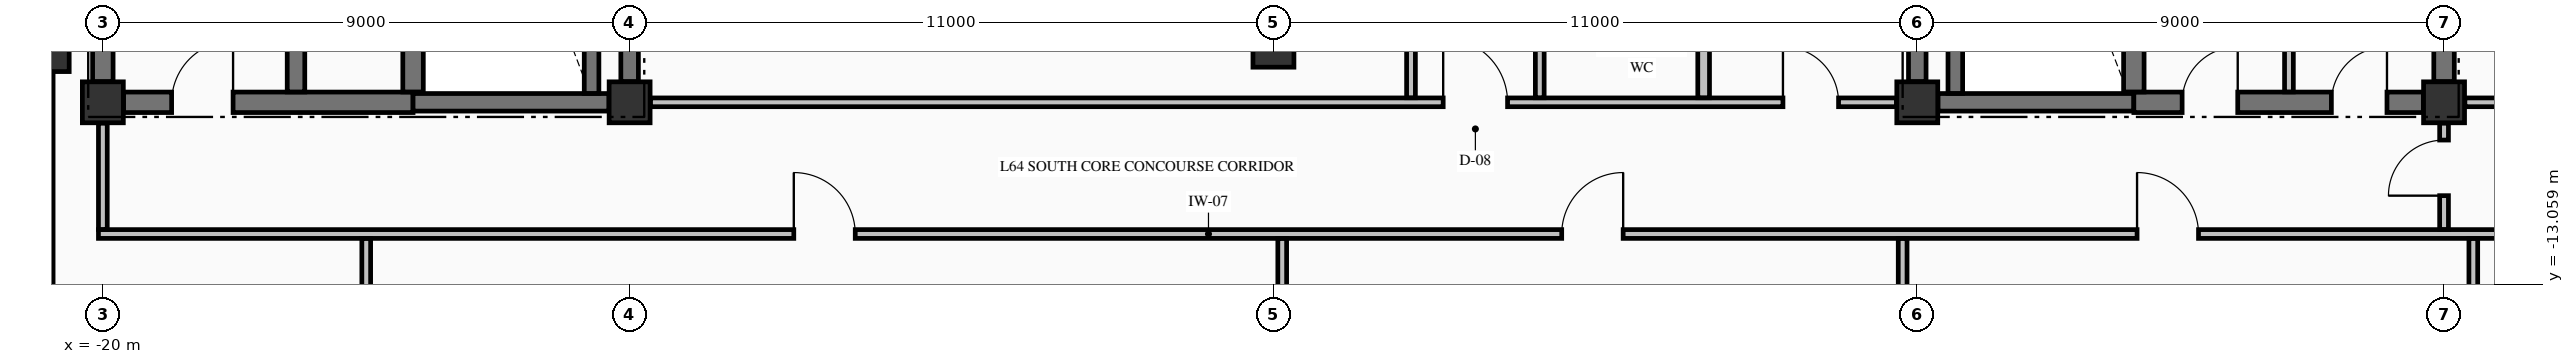
"""IFC4 building model, lengths in metres.
Left out: names, types, materials, properties, quantities, classifications, styles, units other than length and angle.
Written with IfcOpenShell. Run it as: python <this file> out.ifc"""

import sys

from ifc_helpers import new_model, si_unit, direction, frame, frame_2d, origin, origin_2d, place, context, subcontext, project, spatial, rectangle, extrude, element, fill, save


model = new_model("IFC4")
c1 = context("Model", 3, precision=1e-05, world=origin(), true_north=direction((0.0, 1.0)))
c2 = subcontext(c1, "Body", "Model", "MODEL_VIEW")
j1 = project(units=[si_unit("LENGTHUNIT", "METRE"), si_unit("PLANEANGLEUNIT", "RADIAN")], contexts=[c1])
p1 = place(None, origin())
s1 = spatial("IfcSite", under=j1, at=p1, CompositionType="ELEMENT")
p2 = place(p1, origin())
s2 = spatial("IfcBuilding", under=s1, at=p2, CompositionType="ELEMENT")
p3 = place(p2, frame((0.0, 0.0, 242.97)))
s3 = spatial("IfcBuildingStorey", under=s2, at=p3, CompositionType="ELEMENT", Elevation=242.97)
p4 = place(p3, frame((-21.0, -9.0, -0.25), z_axis=(0.0, 0.0, 1.0), x_axis=(1.0, 0.0, 0.0)))
e1 = element("IfcColumn", 1, at=p4, inside=s3, PredefinedType="COLUMN", context=c2, shape_type="SweptSolid", body=[
    extrude(rectangle(XDim=0.85, YDim=0.85, at=origin_2d()), origin(), (0.0, 0.0, 1.0), 3.23),
])
for number, where, z_axis, x_axis in (
    (2, (-20.0, -9.95, -0.25), (0.0, 0.0, 1.0), (1.0, 0.0, 0.0)),
    (3, (-11.0, -9.95, -0.25), (0.0, 0.0, 1.0), (1.0, 0.0, 0.0)),
    (4, (11.0, -9.95, -0.25), (0.0, 0.0, 1.0), (1.0, 0.0, 0.0)),
    (5, (20.0, -9.95, -0.25), (0.0, 0.0, 1.0), (1.0, 0.0, 0.0)),
    (6, (0.0, -9.0, -0.25), (0.0, 0.0, 1.0), (1.0, 0.0, 0.0)),
):
    element("IfcColumn", number, at=place(p3, frame(where, z_axis=z_axis, x_axis=x_axis)), inside=s3, PredefinedType="COLUMN", context=c2, shape_type="SweptSolid", body=[
        extrude(rectangle(XDim=0.7, YDim=0.7, at=origin_2d()), origin(), (0.0, 0.0, 1.0), 3.23),
    ])
p5 = place(p3, frame((-21.0, -9.455, 0.0), z_axis=(0.0, 0.0, 1.0), x_axis=(0.0, -1.0, 0.0)))
e7 = element("IfcWall", 7, at=p5, inside=s3, PredefinedType="STANDARD", context=c2, shape_type="SweptSolid", body=[
    extrude(rectangle(XDim=8.09, YDim=0.3, at=frame_2d((4.045, 0.0))), origin(), (0.0, 0.0, 1.0), 2.372),
])
p6 = place(p3, frame((-19.646, -9.95, 0.0), z_axis=(0.0, 0.0, 1.0), x_axis=(1.0, 0.0, 0.0)))
e8 = element("IfcWall", 8, at=p6, inside=s3, PredefinedType="SHEAR", context=c2, shape_type="SweptSolid", body=[
    extrude(rectangle(XDim=4.946, YDim=0.35, at=frame_2d((2.473, 0.0))), origin(), (0.0, 0.0, 1.0), 2.98),
])
p7 = place(p6, frame((0.821, 0.0, 0.0)))
e9 = element("IfcOpeningElement", 9, at=p7, cuts=e8, PredefinedType="OPENING", context=c2, shape_type="SweptSolid", body=[
    extrude(rectangle(XDim=1.05, YDim=2.15, at=frame_2d((0.525, 1.075))), frame((0.0, 0.185, 0.0), z_axis=(0.0, -1.0, 0.0), x_axis=(1.0, 0.0, 0.0)), (0.0, 0.0, 1.0), 0.37),
])
for number, where, z_axis, x_axis in (
    (10, (-14.7, -9.95, 0.0), (0.0, 0.0, 1.0), (1.0, 0.0, 0.0)),
    (11, (11.354, -9.95, 0.0), (0.0, 0.0, 1.0), (1.0, 0.0, 0.0)),
):
    element("IfcWall", number, at=place(p3, frame(where, z_axis=z_axis, x_axis=x_axis)), inside=s3, PredefinedType="SHEAR", context=c2, shape_type="SweptSolid", body=[
        extrude(rectangle(XDim=3.346, YDim=0.3, at=frame_2d((1.673, 0.0))), origin(), (0.0, 0.0, 1.0), 2.98),
    ])
p8 = place(p3, frame((14.7, -9.95, 0.0), z_axis=(0.0, 0.0, 1.0), x_axis=(1.0, 0.0, 0.0)))
e12 = element("IfcWall", 12, at=p8, inside=s3, PredefinedType="SHEAR", context=c2, shape_type="SweptSolid", body=[
    extrude(rectangle(XDim=4.946, YDim=0.35, at=frame_2d((2.473, 0.0))), origin(), (0.0, 0.0, 1.0), 2.98),
])
p9 = place(p8, frame((0.825, 0.0, 0.0)))
e13 = element("IfcOpeningElement", 13, at=p9, cuts=e12, PredefinedType="OPENING", context=c2, shape_type="SweptSolid", body=[
    extrude(rectangle(XDim=0.95, YDim=2.15, at=frame_2d((0.475, 1.075))), frame((0.0, 0.185, 0.0), z_axis=(0.0, -1.0, 0.0), x_axis=(1.0, 0.0, 0.0)), (0.0, 0.0, 1.0), 0.37),
])
p10 = place(p8, frame((3.375, 0.0, 0.0)))
e14 = element("IfcOpeningElement", 14, at=p10, cuts=e12, PredefinedType="OPENING", context=c2, shape_type="SweptSolid", body=[
    extrude(rectangle(XDim=0.95, YDim=2.15, at=frame_2d((0.475, 1.075))), frame((0.0, 0.185, 0.0), z_axis=(0.0, -1.0, 0.0), x_axis=(1.0, 0.0, 0.0)), (0.0, 0.0, 1.0), 0.37),
])
p11 = place(p3, frame((-20.075, -12.2, 0.0), z_axis=(0.0, 0.0, 1.0), x_axis=(1.0, 0.0, 0.0)))
e15 = element("IfcWall", 15, at=p11, inside=s3, PredefinedType="PARTITIONING", context=c2, shape_type="SweptSolid", body=[
    extrude(rectangle(XDim=45.91, YDim=0.15, at=frame_2d((22.955, 0.0))), origin(), (0.0, 0.0, 1.0), 2.98),
])
p12 = place(p11, frame((11.88, 0.0, 0.0)))
e16 = element("IfcOpeningElement", 16, at=p12, cuts=e15, PredefinedType="OPENING", context=c2, shape_type="SweptSolid", body=[
    extrude(rectangle(XDim=1.05, YDim=2.15, at=frame_2d((0.525, 1.075))), frame((0.0, 0.085, 0.0), z_axis=(0.0, -1.0, 0.0), x_axis=(1.0, 0.0, 0.0)), (0.0, 0.0, 1.0), 0.17),
])
p13 = place(p11, frame((25.0, 0.0, 0.0)))
e17 = element("IfcOpeningElement", 17, at=p13, cuts=e15, PredefinedType="OPENING", context=c2, shape_type="SweptSolid", body=[
    extrude(rectangle(XDim=1.05, YDim=2.15, at=frame_2d((0.525, 1.075))), frame((0.0, 0.085, 0.0), z_axis=(0.0, -1.0, 0.0), x_axis=(1.0, 0.0, 0.0)), (0.0, 0.0, 1.0), 0.17),
])
p14 = place(p11, frame((34.83, 0.0, 0.0)))
e18 = element("IfcOpeningElement", 18, at=p14, cuts=e15, PredefinedType="OPENING", context=c2, shape_type="SweptSolid", body=[
    extrude(rectangle(XDim=1.05, YDim=2.15, at=frame_2d((0.525, 1.075))), frame((0.0, 0.085, 0.0), z_axis=(0.0, -1.0, 0.0), x_axis=(1.0, 0.0, 0.0)), (0.0, 0.0, 1.0), 0.17),
])
p15 = place(p3, frame((-10.644, -9.95, 0.0), z_axis=(0.0, 0.0, 1.0), x_axis=(1.0, 0.0, 0.0)))
e19 = element("IfcWall", 19, at=p15, inside=s3, PredefinedType="PARTITIONING", context=c2, shape_type="SweptSolid", body=[
    extrude(rectangle(XDim=21.288, YDim=0.15, at=frame_2d((10.644, 0.0))), origin(), (0.0, 0.0, 1.0), 2.98),
])
p16 = place(p15, frame((13.544, 0.0, 0.0)))
e20 = element("IfcOpeningElement", 20, at=p16, cuts=e19, PredefinedType="OPENING", context=c2, shape_type="SweptSolid", body=[
    extrude(rectangle(XDim=1.1, YDim=2.15, at=frame_2d((0.55, 1.075))), frame((0.0, 0.085, 0.0), z_axis=(0.0, -1.0, 0.0), x_axis=(1.0, 0.0, 0.0)), (0.0, 0.0, 1.0), 0.17),
])
p17 = place(p15, frame((19.349, 0.0, 0.0)))
e21 = element("IfcOpeningElement", 21, at=p17, cuts=e19, PredefinedType="OPENING", context=c2, shape_type="SweptSolid", body=[
    extrude(rectangle(XDim=0.95, YDim=2.15, at=frame_2d((0.475, 1.075))), frame((0.0, 0.085, 0.0), z_axis=(0.0, -1.0, 0.0), x_axis=(1.0, 0.0, 0.0)), (0.0, 0.0, 1.0), 0.17),
])
p18 = place(p3, frame((20.356, -9.95, 0.0), z_axis=(0.0, 0.0, 1.0), x_axis=(1.0, 0.0, 0.0)))
e22 = element("IfcWall", 22, at=p18, inside=s3, PredefinedType="PARTITIONING", context=c2, shape_type="SweptSolid", body=[
    extrude(rectangle(XDim=5.479, YDim=0.15, at=frame_2d((2.74, 0.0))), origin(), (0.0, 0.0, 1.0), 2.98),
])
p19 = place(p18, frame((2.144, 0.0, 0.0)))
e23 = element("IfcOpeningElement", 23, at=p19, cuts=e22, PredefinedType="OPENING", context=c2, shape_type="SweptSolid", body=[
    extrude(rectangle(XDim=1.0, YDim=2.15, at=frame_2d((0.5, 1.075))), frame((0.0, 0.085, 0.0), z_axis=(0.0, -1.0, 0.0), x_axis=(1.0, 0.0, 0.0)), (0.0, 0.0, 1.0), 0.17),
])
p20 = place(p3, frame((-20.0, -9.596, 0.0), z_axis=(0.0, 0.0, 1.0), x_axis=(0.0, 1.0, 0.0)))
e24 = element("IfcWall", 24, at=p20, inside=s3, PredefinedType="SHEAR", context=c2, shape_type="SweptSolid", body=[
    extrude(rectangle(XDim=9.194, YDim=0.35, at=frame_2d((4.597, 0.0))), origin(), (0.0, 0.0, 1.0), 2.98),
])
p21 = place(p3, frame((-16.7, -9.773, 0.0), z_axis=(0.0, 0.0, 1.0), x_axis=(0.0, 1.0, 0.0)))
e25 = element("IfcWall", 25, at=p21, inside=s3, PredefinedType="SHEAR", context=c2, shape_type="SweptSolid", body=[
    extrude(rectangle(XDim=9.371, YDim=0.3, at=frame_2d((4.686, 0.0))), origin(), (0.0, 0.0, 1.0), 2.98),
])
p22 = place(p3, frame((-14.7, -9.773, 0.0), z_axis=(0.0, 0.0, 1.0), x_axis=(0.0, 1.0, 0.0)))
e26 = element("IfcWall", 26, at=p22, inside=s3, PredefinedType="SHEAR", context=c2, shape_type="SweptSolid", body=[
    extrude(rectangle(XDim=9.371, YDim=0.35, at=frame_2d((4.686, 0.0))), origin(), (0.0, 0.0, 1.0), 2.98),
])
p23 = place(p3, frame((-11.65, -9.798, 0.0), z_axis=(0.0, 0.0, 1.0), x_axis=(0.0, 1.0, 0.0)))
e27 = element("IfcWall", 27, at=p23, inside=s3, PredefinedType="SOLIDWALL", context=c2, shape_type="SweptSolid", body=[
    extrude(rectangle(XDim=9.396, YDim=0.25, at=frame_2d((4.698, 0.0))), origin(), (0.0, 0.0, 1.0), 2.98),
])
for number, where, z_axis, x_axis in (
    (28, (-11.0, -9.596, 0.0), (0.0, 0.0, 1.0), (0.0, 1.0, 0.0)),
    (29, (11.0, -9.596, 0.0), (0.0, 0.0, 1.0), (0.0, 1.0, 0.0)),
):
    element("IfcWall", number, at=place(p3, frame(where, z_axis=z_axis, x_axis=x_axis)), inside=s3, PredefinedType="SHEAR", context=c2, shape_type="SweptSolid", body=[
        extrude(rectangle(XDim=9.242, YDim=0.3, at=frame_2d((4.621, 0.0))), origin(), (0.0, 0.0, 1.0), 2.98),
    ])
p24 = place(p3, frame((11.65, -9.798, 0.0), z_axis=(0.0, 0.0, 1.0), x_axis=(0.0, 1.0, 0.0)))
e30 = element("IfcWall", 30, at=p24, inside=s3, PredefinedType="SOLIDWALL", context=c2, shape_type="SweptSolid", body=[
    extrude(rectangle(XDim=9.396, YDim=0.25, at=frame_2d((4.698, 0.0))), origin(), (0.0, 0.0, 1.0), 2.98),
])
p25 = place(p3, frame((14.7, -9.773, 0.0), z_axis=(0.0, 0.0, 1.0), x_axis=(0.0, 1.0, 0.0)))
e31 = element("IfcWall", 31, at=p25, inside=s3, PredefinedType="SHEAR", context=c2, shape_type="SweptSolid", body=[
    extrude(rectangle(XDim=9.371, YDim=0.35, at=frame_2d((4.686, 0.0))), origin(), (0.0, 0.0, 1.0), 2.98),
])
p26 = place(p3, frame((20.0, -9.596, 0.0), z_axis=(0.0, 0.0, 1.0), x_axis=(0.0, 1.0, 0.0)))
e32 = element("IfcWall", 32, at=p26, inside=s3, PredefinedType="SHEAR", context=c2, shape_type="SweptSolid", body=[
    extrude(rectangle(XDim=9.242, YDim=0.35, at=frame_2d((4.621, 0.0))), origin(), (0.0, 0.0, 1.0), 2.98),
])
p27 = place(p3, frame((-20.0, -12.122, 0.0), z_axis=(0.0, 0.0, 1.0), x_axis=(0.0, 1.0, 0.0)))
e33 = element("IfcWall", 33, at=p27, inside=s3, PredefinedType="PARTITIONING", context=c2, shape_type="SweptSolid", body=[
    extrude(rectangle(XDim=1.816, YDim=0.15, at=frame_2d((0.908, 0.0))), origin(), (0.0, 0.0, 1.0), 2.57),
])
p28 = place(p3, frame((-15.5, -17.569, 0.0), z_axis=(0.0, 0.0, 1.0), x_axis=(0.0, 1.0, 0.0)))
e34 = element("IfcWall", 34, at=p28, inside=s3, PredefinedType="PARTITIONING", context=c2, shape_type="SweptSolid", body=[
    extrude(rectangle(XDim=5.291, YDim=0.15, at=frame_2d((2.646, 0.0))), origin(), (0.0, 0.0, 1.0), 2.98),
])
p29 = place(p3, frame((0.15, -23.069, 0.0), z_axis=(0.0, 0.0, 1.0), x_axis=(0.0, 1.0, 0.0)))
e35 = element("IfcWall", 35, at=p29, inside=s3, PredefinedType="PARTITIONING", context=c2, shape_type="SweptSolid", body=[
    extrude(rectangle(XDim=10.791, YDim=0.15, at=frame_2d((5.396, 0.0))), origin(), (0.0, 0.0, 1.0), 2.57),
])
p30 = place(p3, frame((2.35, -9.872, 0.0), z_axis=(0.0, 0.0, 1.0), x_axis=(0.0, 1.0, 0.0)))
e36 = element("IfcWall", 36, at=p30, inside=s3, PredefinedType="PARTITIONING", context=c2, shape_type="SweptSolid", body=[
    extrude(rectangle(XDim=9.544, YDim=0.15, at=frame_2d((4.772, 0.0))), origin(), (0.0, 0.0, 1.0), 2.98),
])
p31 = place(p3, frame((4.55, -9.872, 0.0), z_axis=(0.0, 0.0, 1.0), x_axis=(0.0, 1.0, 0.0)))
e37 = element("IfcWall", 37, at=p31, inside=s3, PredefinedType="PARTITIONING", context=c2, shape_type="SweptSolid", body=[
    extrude(rectangle(XDim=4.919, YDim=0.15, at=frame_2d((2.459, 0.0))), origin(), (0.0, 0.0, 1.0), 2.98),
])
p32 = place(p31, frame((1.997, 0.0, 0.0)))
e38 = element("IfcOpeningElement", 38, at=p32, cuts=e37, PredefinedType="OPENING", context=c2, shape_type="SweptSolid", body=[
    extrude(rectangle(XDim=0.95, YDim=2.15, at=frame_2d((0.475, 1.075))), frame((0.0, 0.085, 0.0), z_axis=(0.0, -1.0, 0.0), x_axis=(1.0, 0.0, 0.0)), (0.0, 0.0, 1.0), 0.17),
])
p33 = place(p3, frame((7.35, -9.872, 0.0), z_axis=(0.0, 0.0, 1.0), x_axis=(0.0, 1.0, 0.0)))
e39 = element("IfcWall", 39, at=p33, inside=s3, PredefinedType="PARTITIONING", context=c2, shape_type="SweptSolid", body=[
    extrude(rectangle(XDim=4.919, YDim=0.2, at=frame_2d((2.459, 0.0))), origin(), (0.0, 0.0, 1.0), 2.98),
])
p34 = place(p3, frame((10.75, -23.069, 0.0), z_axis=(0.0, 0.0, 1.0), x_axis=(0.0, 1.0, 0.0)))
e40 = element("IfcWall", 40, at=p34, inside=s3, PredefinedType="PARTITIONING", context=c2, shape_type="SweptSolid", body=[
    extrude(rectangle(XDim=10.791, YDim=0.15, at=frame_2d((5.396, 0.0))), origin(), (0.0, 0.0, 1.0), 2.57),
])
p35 = place(p3, frame((17.35, -9.772, 0.0), z_axis=(0.0, 0.0, 1.0), x_axis=(0.0, 1.0, 0.0)))
e41 = element("IfcWall", 41, at=p35, inside=s3, PredefinedType="PARTITIONING", context=c2, shape_type="SweptSolid", body=[
    extrude(rectangle(XDim=7.194, YDim=0.15, at=frame_2d((3.597, 0.0))), origin(), (0.0, 0.0, 1.0), 2.98),
])
p36 = place(p3, frame((20.0, -12.122, 0.0), z_axis=(0.0, 0.0, 1.0), x_axis=(0.0, 1.0, 0.0)))
e42 = element("IfcWall", 42, at=p36, inside=s3, PredefinedType="PARTITIONING", context=c2, shape_type="SweptSolid", body=[
    extrude(rectangle(XDim=1.816, YDim=0.15, at=frame_2d((0.908, 0.0))), origin(), (0.0, 0.0, 1.0), 2.98),
])
p37 = place(p36, frame((0.577, 0.0, 0.0)))
e43 = element("IfcOpeningElement", 43, at=p37, cuts=e42, PredefinedType="OPENING", context=c2, shape_type="SweptSolid", body=[
    extrude(rectangle(XDim=0.95, YDim=2.15, at=frame_2d((0.475, 1.075))), frame((0.0, 0.085, 0.0), z_axis=(0.0, -1.0, 0.0), x_axis=(1.0, 0.0, 0.0)), (0.0, 0.0, 1.0), 0.17),
])
p38 = place(p3, frame((20.5, -17.569, 0.0), z_axis=(0.0, 0.0, 1.0), x_axis=(0.0, 1.0, 0.0)))
e44 = element("IfcWall", 44, at=p38, inside=s3, PredefinedType="PARTITIONING", context=c2, shape_type="SweptSolid", body=[
    extrude(rectangle(XDim=5.291, YDim=0.15, at=frame_2d((2.646, 0.0))), origin(), (0.0, 0.0, 1.0), 2.98),
])
p39 = place(p7, origin())
e45 = element("IfcDoor", 45, at=p39, inside=s3, OperationType="SINGLE_SWING_RIGHT", PredefinedType="DOOR", context=c2, shape_type="SweptSolid", body=[
    extrude(rectangle(XDim=1.05, YDim=2.15, at=frame_2d((0.525, 1.075))), frame((0.0, 0.025, 0.0), z_axis=(0.0, -1.0, 0.0), x_axis=(1.0, 0.0, 0.0)), (0.0, 0.0, 1.0), 0.05),
])
fill(e9, e45)
p40 = place(p9, origin())
e46 = element("IfcDoor", 46, at=p40, inside=s3, OperationType="SINGLE_SWING_RIGHT", PredefinedType="DOOR", context=c2, shape_type="SweptSolid", body=[
    extrude(rectangle(XDim=0.95, YDim=2.15, at=frame_2d((0.475, 1.075))), frame((0.0, 0.025, 0.0), z_axis=(0.0, -1.0, 0.0), x_axis=(1.0, 0.0, 0.0)), (0.0, 0.0, 1.0), 0.05),
])
fill(e13, e46)
p41 = place(p10, origin())
e47 = element("IfcDoor", 47, at=p41, inside=s3, OperationType="SINGLE_SWING_RIGHT", PredefinedType="DOOR", context=c2, shape_type="SweptSolid", body=[
    extrude(rectangle(XDim=0.95, YDim=2.15, at=frame_2d((0.475, 1.075))), frame((0.0, 0.025, 0.0), z_axis=(0.0, -1.0, 0.0), x_axis=(1.0, 0.0, 0.0)), (0.0, 0.0, 1.0), 0.05),
])
fill(e14, e47)
p42 = place(p16, origin())
e48 = element("IfcDoor", 48, at=p42, inside=s3, OperationType="SINGLE_SWING_LEFT", PredefinedType="DOOR", context=c2, shape_type="SweptSolid", body=[
    extrude(rectangle(XDim=1.1, YDim=2.15, at=frame_2d((0.55, 1.075))), frame((0.0, 0.025, 0.0), z_axis=(0.0, -1.0, 0.0), x_axis=(1.0, 0.0, 0.0)), (0.0, 0.0, 1.0), 0.05),
])
fill(e20, e48)
p43 = place(p12, origin())
e49 = element("IfcDoor", 49, at=p43, inside=s3, OperationType="SINGLE_SWING_LEFT", PredefinedType="DOOR", context=c2, shape_type="SweptSolid", body=[
    extrude(rectangle(XDim=1.05, YDim=2.15, at=frame_2d((0.525, 1.075))), frame((0.0, 0.025, 0.0), z_axis=(0.0, -1.0, 0.0), x_axis=(1.0, 0.0, 0.0)), (0.0, 0.0, 1.0), 0.05),
])
fill(e16, e49)
p44 = place(p13, origin())
e50 = element("IfcDoor", 50, at=p44, inside=s3, OperationType="SINGLE_SWING_RIGHT", PredefinedType="DOOR", context=c2, shape_type="SweptSolid", body=[
    extrude(rectangle(XDim=1.05, YDim=2.15, at=frame_2d((0.525, 1.075))), frame((0.0, 0.025, 0.0), z_axis=(0.0, -1.0, 0.0), x_axis=(1.0, 0.0, 0.0)), (0.0, 0.0, 1.0), 0.05),
])
fill(e17, e50)
p45 = place(p14, origin())
e51 = element("IfcDoor", 51, at=p45, inside=s3, OperationType="SINGLE_SWING_LEFT", PredefinedType="DOOR", context=c2, shape_type="SweptSolid", body=[
    extrude(rectangle(XDim=1.05, YDim=2.15, at=frame_2d((0.525, 1.075))), frame((0.0, 0.025, 0.0), z_axis=(0.0, -1.0, 0.0), x_axis=(1.0, 0.0, 0.0)), (0.0, 0.0, 1.0), 0.05),
])
fill(e18, e51)
p46 = place(p17, origin())
e52 = element("IfcDoor", 52, at=p46, inside=s3, OperationType="SINGLE_SWING_LEFT", PredefinedType="DOOR", context=c2, shape_type="SweptSolid", body=[
    extrude(rectangle(XDim=0.95, YDim=2.15, at=frame_2d((0.475, 1.075))), frame((0.0, 0.025, 0.0), z_axis=(0.0, -1.0, 0.0), x_axis=(1.0, 0.0, 0.0)), (0.0, 0.0, 1.0), 0.05),
])
fill(e21, e52)
p47 = place(p37, origin())
e53 = element("IfcDoor", 53, at=p47, inside=s3, OperationType="SINGLE_SWING_LEFT", PredefinedType="DOOR", context=c2, shape_type="SweptSolid", body=[
    extrude(rectangle(XDim=0.95, YDim=2.15, at=frame_2d((0.475, 1.075))), frame((0.0, 0.025, 0.0), z_axis=(0.0, -1.0, 0.0), x_axis=(1.0, 0.0, 0.0)), (0.0, 0.0, 1.0), 0.05),
])
fill(e43, e53)
save(model, sys.argv[1])
